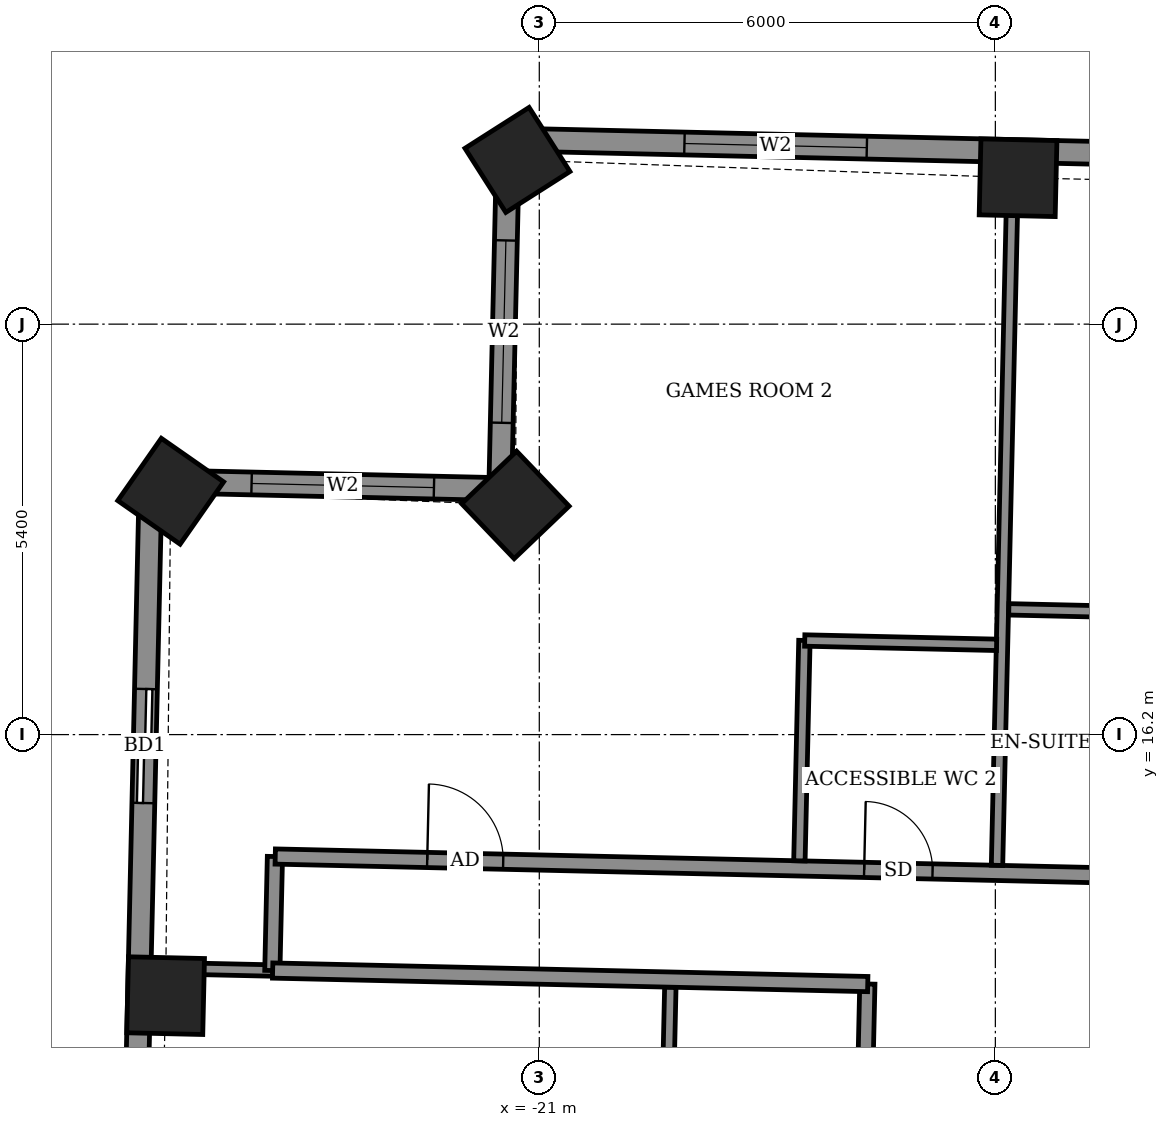
"""IFC4 building model, lengths in metres.
Left out: names, types, materials, properties, quantities, classifications, styles, units other than length and angle.
Written with IfcOpenShell. Run it as: python <this file> out.ifc"""

import sys

from ifc_helpers import new_model, si_unit, direction, frame, frame_2d, origin, origin_2d, place, context, subcontext, project, spatial, rectangle, extrude, element, fill, save


model = new_model("IFC4")
c1 = context("Model", 3, precision=1e-05, world=origin(), true_north=direction((0.0, 1.0)))
c2 = subcontext(c1, "Body", "Model", "MODEL_VIEW")
j1 = project(units=[si_unit("LENGTHUNIT", "METRE"), si_unit("PLANEANGLEUNIT", "RADIAN")], contexts=[c1])
p1 = place(None, origin())
s1 = spatial("IfcSite", under=j1, at=p1, CompositionType="ELEMENT")
p2 = place(p1, origin())
s2 = spatial("IfcBuilding", under=s1, at=p2, CompositionType="ELEMENT")
p3 = place(p2, frame((0.0, 0.0, 257.3)))
s3 = spatial("IfcBuildingStorey", under=s2, at=p3, CompositionType="ELEMENT", Elevation=257.3)
for number, where, z_axis, x_axis in (
    (1, (-14.701, 23.526, -0.55), (0.0, 0.0, 1.0), (-1.0, 0.023, 0.0)),
    (2, (-21.287, 23.76, -0.55), (0.0, 0.0, 1.0), (-0.843, -0.538, 0.0)),
    (3, (-21.314, 19.221, -0.55), (0.0, 0.0, 1.0), (-0.723, -0.691, 0.0)),
    (4, (-25.849, 19.402, -0.55), (0.0, 0.0, 1.0), (-0.573, -0.82, 0.0)),
    (5, (-25.916, 12.766, -0.55), (0.0, 0.0, 1.0), (-0.023, -1.0, 0.0)),
):
    element("IfcColumn", number, at=place(p3, frame(where, z_axis=z_axis, x_axis=x_axis)), inside=s3, PredefinedType="COLUMN", context=c2, shape_type="SweptSolid", body=[
        extrude(rectangle(XDim=1.0, YDim=1.0, at=origin_2d()), origin(), (0.0, 0.0, 1.0), 3.6),
    ])
p4 = place(p3, frame((26.35, 22.945, 0.0), z_axis=(0.0, 0.0, 1.0), x_axis=(-0.999742523712, 0.022691105788, 0.0)))
e6 = element("IfcWall", 6, at=p4, inside=s3, PredefinedType="SOLIDWALL", context=c2, shape_type="SweptSolid", body=[
    extrude(rectangle(XDim=47.771, YDim=0.3, at=frame_2d((23.886, 0.0))), origin(), (0.0, 0.0, 1.0), 2.55),
])
p5 = place(p4, frame((1.578, 0.0, 0.0)))
e7 = element("IfcOpeningElement", 7, at=p5, cuts=e6, PredefinedType="OPENING", context=c2, shape_type="SweptSolid", body=[
    extrude(rectangle(XDim=1.5, YDim=2.4, at=frame_2d((0.75, 1.2))), frame((0.0, 0.16, 0.0), z_axis=(0.0, -1.0, 0.0), x_axis=(1.0, 0.0, 0.0)), (0.0, 0.0, 1.0), 0.32),
])
p6 = place(p4, frame((4.545, 0.0, 0.0)))
e8 = element("IfcOpeningElement", 8, at=p6, cuts=e6, PredefinedType="OPENING", context=c2, shape_type="SweptSolid", body=[
    extrude(rectangle(XDim=1.5, YDim=2.4, at=frame_2d((0.75, 1.2))), frame((0.0, 0.16, 0.0), z_axis=(0.0, -1.0, 0.0), x_axis=(1.0, 0.0, 0.0)), (0.0, 0.0, 1.0), 0.32),
])
p7 = place(p4, frame((10.354, 0.0, 0.0)))
e9 = element("IfcOpeningElement", 9, at=p7, cuts=e6, PredefinedType="OPENING", context=c2, shape_type="SweptSolid", body=[
    extrude(rectangle(XDim=1.5, YDim=2.4, at=frame_2d((0.75, 1.2))), frame((0.0, 0.16, 0.0), z_axis=(0.0, -1.0, 0.0), x_axis=(1.0, 0.0, 0.0)), (0.0, 0.0, 1.0), 0.32),
])
p8 = place(p4, frame((15.204, 0.0, 0.0)))
e10 = element("IfcOpeningElement", 10, at=p8, cuts=e6, PredefinedType="OPENING", context=c2, shape_type="SweptSolid", body=[
    extrude(rectangle(XDim=1.5, YDim=2.4, at=frame_2d((0.75, 1.2))), frame((0.0, 0.16, 0.0), z_axis=(0.0, -1.0, 0.0), x_axis=(1.0, 0.0, 0.0)), (0.0, 0.0, 1.0), 0.32),
])
p9 = place(p4, frame((18.537, 0.0, 0.0)))
e11 = element("IfcOpeningElement", 11, at=p9, cuts=e6, PredefinedType="OPENING", context=c2, shape_type="SweptSolid", body=[
    extrude(rectangle(XDim=1.2, YDim=2.4, at=frame_2d((0.6, 1.2))), frame((0.0, 0.16, 0.0), z_axis=(0.0, -1.0, 0.0), x_axis=(1.0, 0.0, 0.0)), (0.0, 0.0, 1.0), 0.32),
])
p10 = place(p4, frame((24.171, 0.0, 0.0)))
e12 = element("IfcOpeningElement", 12, at=p10, cuts=e6, PredefinedType="OPENING", context=c2, shape_type="SweptSolid", body=[
    extrude(rectangle(XDim=1.5, YDim=2.4, at=frame_2d((0.75, 1.2))), frame((0.0, 0.16, 0.0), z_axis=(0.0, -1.0, 0.0), x_axis=(1.0, 0.0, 0.0)), (0.0, 0.0, 1.0), 0.32),
])
p11 = place(p4, frame((28.871, 0.0, 0.0)))
e13 = element("IfcOpeningElement", 13, at=p11, cuts=e6, PredefinedType="OPENING", context=c2, shape_type="SweptSolid", body=[
    extrude(rectangle(XDim=1.5, YDim=2.4, at=frame_2d((0.75, 1.2))), frame((0.0, 0.16, 0.0), z_axis=(0.0, -1.0, 0.0), x_axis=(1.0, 0.0, 0.0)), (0.0, 0.0, 1.0), 0.32),
])
p12 = place(p4, frame((32.055, 0.0, 0.0)))
e14 = element("IfcOpeningElement", 14, at=p12, cuts=e6, PredefinedType="OPENING", context=c2, shape_type="SweptSolid", body=[
    extrude(rectangle(XDim=1.5, YDim=2.4, at=frame_2d((0.75, 1.2))), frame((0.0, 0.16, 0.0), z_axis=(0.0, -1.0, 0.0), x_axis=(1.0, 0.0, 0.0)), (0.0, 0.0, 1.0), 0.32),
])
p13 = place(p4, frame((37.813, 0.0, 0.0)))
e15 = element("IfcOpeningElement", 15, at=p13, cuts=e6, PredefinedType="OPENING", context=c2, shape_type="SweptSolid", body=[
    extrude(rectangle(XDim=1.5, YDim=2.4, at=frame_2d((0.75, 1.2))), frame((0.0, 0.16, 0.0), z_axis=(0.0, -1.0, 0.0), x_axis=(1.0, 0.0, 0.0)), (0.0, 0.0, 1.0), 0.32),
])
p14 = place(p4, frame((43.052, 0.0, 0.9)))
e16 = element("IfcOpeningElement", 16, at=p14, cuts=e6, PredefinedType="OPENING", context=c2, shape_type="SweptSolid", body=[
    extrude(rectangle(XDim=2.4, YDim=1.5, at=frame_2d((1.2, 0.75))), frame((0.0, 0.16, 0.0), z_axis=(0.0, -1.0, 0.0), x_axis=(1.0, 0.0, 0.0)), (0.0, 0.0, 1.0), 0.32),
])
p15 = place(p3, frame((-21.409, 24.029, 0.0), z_axis=(0.0, 0.0, 1.0), x_axis=(-0.022820258049, -0.999739584003, 0.0)))
e17 = element("IfcWall", 17, at=p15, inside=s3, PredefinedType="SOLIDWALL", context=c2, shape_type="SweptSolid", body=[
    extrude(rectangle(XDim=4.6, YDim=0.3, at=frame_2d((2.3, 0.0))), origin(), (0.0, 0.0, 1.0), 2.55),
])
p16 = place(p15, frame((1.328, 0.0, 0.9)))
e18 = element("IfcOpeningElement", 18, at=p16, cuts=e17, PredefinedType="OPENING", context=c2, shape_type="SweptSolid", body=[
    extrude(rectangle(XDim=2.4, YDim=1.5, at=frame_2d((1.2, 0.75))), frame((0.0, 0.16, 0.0), z_axis=(0.0, -1.0, 0.0), x_axis=(1.0, 0.0, 0.0)), (0.0, 0.0, 1.0), 0.32),
])
p17 = place(p3, frame((-21.514, 19.43, 0.0), z_axis=(0.0, 0.0, 1.0), x_axis=(-0.999744404568, 0.02260808559, 0.0)))
e19 = element("IfcWall", 19, at=p17, inside=s3, PredefinedType="SOLIDWALL", context=c2, shape_type="SweptSolid", body=[
    extrude(rectangle(XDim=4.6, YDim=0.3, at=frame_2d((2.3, 0.0))), origin(), (0.0, 0.0, 1.0), 2.55),
])
p18 = place(p17, frame((0.872, 0.0, 0.9)))
e20 = element("IfcOpeningElement", 20, at=p18, cuts=e19, PredefinedType="OPENING", context=c2, shape_type="SweptSolid", body=[
    extrude(rectangle(XDim=2.4, YDim=1.5, at=frame_2d((1.2, 0.75))), frame((0.0, 0.16, 0.0), z_axis=(0.0, -1.0, 0.0), x_axis=(1.0, 0.0, 0.0)), (0.0, 0.0, 1.0), 0.32),
])
p19 = place(p3, frame((-26.113, 19.534, 0.0), z_axis=(0.0, 0.0, 1.0), x_axis=(-0.022649415303, -0.999743469089, 0.0)))
e21 = element("IfcWall", 21, at=p19, inside=s3, PredefinedType="SOLIDWALL", context=c2, shape_type="SweptSolid", body=[
    extrude(rectangle(XDim=14.175, YDim=0.3, at=frame_2d((7.087, 0.0))), origin(), (0.0, 0.0, 1.0), 2.55),
])
p20 = place(p19, frame((2.735, 0.0, 0.0)))
e22 = element("IfcOpeningElement", 22, at=p20, cuts=e21, PredefinedType="OPENING", context=c2, shape_type="SweptSolid", body=[
    extrude(rectangle(XDim=1.5, YDim=2.4, at=frame_2d((0.75, 1.2))), frame((0.0, 0.16, 0.0), z_axis=(0.0, -1.0, 0.0), x_axis=(1.0, 0.0, 0.0)), (0.0, 0.0, 1.0), 0.32),
])
p21 = place(p19, frame((9.019, 0.0, 0.9)))
e23 = element("IfcOpeningElement", 23, at=p21, cuts=e21, PredefinedType="OPENING", context=c2, shape_type="SweptSolid", body=[
    extrude(rectangle(XDim=2.4, YDim=1.5, at=frame_2d((1.2, 0.75))), frame((0.0, 0.16, 0.0), z_axis=(0.0, -1.0, 0.0), x_axis=(1.0, 0.0, 0.0)), (0.0, 0.0, 1.0), 0.32),
])
p22 = place(p3, frame((-17.262, -12.525, 0.0), z_axis=(0.0, 0.0, 1.0), x_axis=(0.022706151961, 0.999742182097, 0.0)))
e24 = element("IfcWall", 24, at=p22, inside=s3, PredefinedType="PARTITIONING", context=c2, shape_type="SweptSolid", body=[
    extrude(rectangle(XDim=25.45, YDim=0.2, at=frame_2d((12.725, 0.0))), origin(), (0.0, 0.0, 1.0), 3.05),
])
p23 = place(p22, frame((19.913, 0.0, 0.0)))
e25 = element("IfcOpeningElement", 25, at=p23, cuts=e24, PredefinedType="OPENING", context=c2, shape_type="SweptSolid", body=[
    extrude(rectangle(XDim=1.0, YDim=2.1, at=frame_2d((0.5, 1.05))), frame((0.0, 0.11, 0.0), z_axis=(0.0, -1.0, 0.0), x_axis=(1.0, 0.0, 0.0)), (0.0, 0.0, 1.0), 0.22),
])
p24 = place(p22, frame((23.6, 0.0, 0.0)))
e26 = element("IfcOpeningElement", 26, at=p24, cuts=e24, PredefinedType="OPENING", context=c2, shape_type="SweptSolid", body=[
    extrude(rectangle(XDim=0.9, YDim=2.1, at=frame_2d((0.45, 1.05))), frame((0.0, 0.11, 0.0), z_axis=(0.0, -1.0, 0.0), x_axis=(1.0, 0.0, 0.0)), (0.0, 0.0, 1.0), 0.22),
])
p25 = place(p22, frame((14.05, 0.0, 0.0)))
e27 = element("IfcOpeningElement", 27, at=p25, cuts=e24, PredefinedType="OPENING", context=c2, shape_type="SweptSolid", body=[
    extrude(rectangle(XDim=1.0, YDim=2.1, at=frame_2d((0.5, 1.05))), frame((0.0, 0.11, 0.0), z_axis=(0.0, -1.0, 0.0), x_axis=(1.0, 0.0, 0.0)), (0.0, 0.0, 1.0), 0.22),
])
p26 = place(p22, frame((16.525, 0.0, 0.0)))
e28 = element("IfcOpeningElement", 28, at=p26, cuts=e24, PredefinedType="OPENING", context=c2, shape_type="SweptSolid", body=[
    extrude(rectangle(XDim=0.9, YDim=2.1, at=frame_2d((0.45, 1.05))), frame((0.0, 0.11, 0.0), z_axis=(0.0, -1.0, 0.0), x_axis=(1.0, 0.0, 0.0)), (0.0, 0.0, 1.0), 0.22),
])
p27 = place(p22, frame((11.825, 0.0, 0.0)))
e29 = element("IfcOpeningElement", 29, at=p27, cuts=e24, PredefinedType="OPENING", context=c2, shape_type="SweptSolid", body=[
    extrude(rectangle(XDim=1.0, YDim=2.1, at=frame_2d((0.5, 1.05))), frame((0.0, 0.11, 0.0), z_axis=(0.0, -1.0, 0.0), x_axis=(1.0, 0.0, 0.0)), (0.0, 0.0, 1.0), 0.22),
])
p28 = place(p22, frame((9.575, 0.0, 0.0)))
e30 = element("IfcOpeningElement", 30, at=p28, cuts=e24, PredefinedType="OPENING", context=c2, shape_type="SweptSolid", body=[
    extrude(rectangle(XDim=0.9, YDim=2.1, at=frame_2d((0.45, 1.05))), frame((0.0, 0.11, 0.0), z_axis=(0.0, -1.0, 0.0), x_axis=(1.0, 0.0, 0.0)), (0.0, 0.0, 1.0), 0.22),
])
p29 = place(p22, frame((6.155, 0.0, 0.0)))
e31 = element("IfcOpeningElement", 31, at=p29, cuts=e24, PredefinedType="OPENING", context=c2, shape_type="SweptSolid", body=[
    extrude(rectangle(XDim=1.0, YDim=2.1, at=frame_2d((0.5, 1.05))), frame((0.0, 0.11, 0.0), z_axis=(0.0, -1.0, 0.0), x_axis=(1.0, 0.0, 0.0)), (0.0, 0.0, 1.0), 0.22),
])
p30 = place(p22, frame((0.512, 0.0, 0.0)))
e32 = element("IfcOpeningElement", 32, at=p30, cuts=e24, PredefinedType="OPENING", context=c2, shape_type="SweptSolid", body=[
    extrude(rectangle(XDim=1.0, YDim=2.1, at=frame_2d((0.5, 1.05))), frame((0.0, 0.11, 0.0), z_axis=(0.0, -1.0, 0.0), x_axis=(1.0, 0.0, 0.0)), (0.0, 0.0, 1.0), 0.22),
])
p31 = place(p22, frame((2.775, 0.0, 0.0)))
e33 = element("IfcOpeningElement", 33, at=p31, cuts=e24, PredefinedType="OPENING", context=c2, shape_type="SweptSolid", body=[
    extrude(rectangle(XDim=0.9, YDim=2.1, at=frame_2d((0.45, 1.05))), frame((0.0, 0.11, 0.0), z_axis=(0.0, -1.0, 0.0), x_axis=(1.0, 0.0, 0.0)), (0.0, 0.0, 1.0), 0.22),
])
p32 = place(p3, frame((-19.337, 10.178, 0.0), z_axis=(0.0, 0.0, 1.0), x_axis=(0.02260842146, 0.999744396973, 0.0)))
e34 = element("IfcWall", 34, at=p32, inside=s3, PredefinedType="PARTITIONING", context=c2, shape_type="SweptSolid", body=[
    extrude(rectangle(XDim=2.7, YDim=0.15, at=frame_2d((1.35, 0.0))), origin(), (0.0, 0.0, 1.0), 3.05),
])
p33 = place(p3, frame((-26.108, 13.132, 0.0), z_axis=(0.0, 0.0, 1.0), x_axis=(0.999746371854, -0.022520922836, 0.0)))
e35 = element("IfcWall", 35, at=p33, inside=s3, PredefinedType="PARTITIONING", context=c2, shape_type="SweptSolid", body=[
    extrude(rectangle(XDim=1.604, YDim=0.15, at=frame_2d((0.802, 0.0))), origin(), (0.0, 0.0, 1.0), 3.05),
])
p34 = place(p3, frame((-24.512, 13.096, 0.0), z_axis=(0.0, 0.0, 1.0), x_axis=(0.022617910375, 0.999744182344, 0.0)))
e36 = element("IfcWall", 36, at=p34, inside=s3, PredefinedType="PARTITIONING", context=c2, shape_type="SweptSolid", body=[
    extrude(rectangle(XDim=1.5, YDim=0.2, at=frame_2d((0.75, 0.0))), origin(), (0.0, 0.0, 1.0), 3.05),
])
p35 = place(p3, frame((-24.508, 13.096, 0.0), z_axis=(0.0, 0.0, 1.0), x_axis=(0.99974170677, -0.022727070732, 0.0)))
e37 = element("IfcWall", 37, at=p35, inside=s3, PredefinedType="PARTITIONING", context=c2, shape_type="SweptSolid", body=[
    extrude(rectangle(XDim=7.831, YDim=0.2, at=frame_2d((3.916, 0.0))), origin(), (0.0, 0.0, 1.0), 3.05),
])
p36 = place(p3, frame((-24.474, 14.596, 0.0), z_axis=(0.0, 0.0, 1.0), x_axis=(0.999742424031, -0.022695497208, 0.0)))
e38 = element("IfcWall", 38, at=p36, inside=s3, PredefinedType="PARTITIONING", context=c2, shape_type="SweptSolid", body=[
    extrude(rectangle(XDim=52.872, YDim=0.2, at=frame_2d((26.436, 0.0))), origin(), (0.0, 0.0, 1.0), 3.05),
])
p37 = place(p36, frame((51.336, 0.0, 0.0)))
e39 = element("IfcOpeningElement", 39, at=p37, cuts=e38, PredefinedType="OPENING", context=c2, shape_type="SweptSolid", body=[
    extrude(rectangle(XDim=1.0, YDim=2.1, at=frame_2d((0.5, 1.05))), frame((0.0, 0.11, 0.0), z_axis=(0.0, -1.0, 0.0), x_axis=(1.0, 0.0, 0.0)), (0.0, 0.0, 1.0), 0.22),
])
p38 = place(p36, frame((47.25, 0.0, 0.0)))
e40 = element("IfcOpeningElement", 40, at=p38, cuts=e38, PredefinedType="OPENING", context=c2, shape_type="SweptSolid", body=[
    extrude(rectangle(XDim=0.9, YDim=2.1, at=frame_2d((0.45, 1.05))), frame((0.0, 0.11, 0.0), z_axis=(0.0, -1.0, 0.0), x_axis=(1.0, 0.0, 0.0)), (0.0, 0.0, 1.0), 0.22),
])
p39 = place(p36, frame((42.475, 0.0, 0.0)))
e41 = element("IfcOpeningElement", 41, at=p39, cuts=e38, PredefinedType="OPENING", context=c2, shape_type="SweptSolid", body=[
    extrude(rectangle(XDim=0.9, YDim=2.1, at=frame_2d((0.45, 1.05))), frame((0.0, 0.11, 0.0), z_axis=(0.0, -1.0, 0.0), x_axis=(1.0, 0.0, 0.0)), (0.0, 0.0, 1.0), 0.22),
])
p40 = place(p36, frame((40.15, 0.0, 0.0)))
e42 = element("IfcOpeningElement", 42, at=p40, cuts=e38, PredefinedType="OPENING", context=c2, shape_type="SweptSolid", body=[
    extrude(rectangle(XDim=0.9, YDim=2.1, at=frame_2d((0.45, 1.05))), frame((0.0, 0.11, 0.0), z_axis=(0.0, -1.0, 0.0), x_axis=(1.0, 0.0, 0.0)), (0.0, 0.0, 1.0), 0.22),
])
p41 = place(p36, frame((33.15, 0.0, 0.0)))
e43 = element("IfcOpeningElement", 43, at=p41, cuts=e38, PredefinedType="OPENING", context=c2, shape_type="SweptSolid", body=[
    extrude(rectangle(XDim=0.9, YDim=2.1, at=frame_2d((0.45, 1.05))), frame((0.0, 0.11, 0.0), z_axis=(0.0, -1.0, 0.0), x_axis=(1.0, 0.0, 0.0)), (0.0, 0.0, 1.0), 0.22),
])
p42 = place(p36, frame((30.95, 0.0, 0.0)))
e44 = element("IfcOpeningElement", 44, at=p42, cuts=e38, PredefinedType="OPENING", context=c2, shape_type="SweptSolid", body=[
    extrude(rectangle(XDim=0.9, YDim=2.1, at=frame_2d((0.45, 1.05))), frame((0.0, 0.11, 0.0), z_axis=(0.0, -1.0, 0.0), x_axis=(1.0, 0.0, 0.0)), (0.0, 0.0, 1.0), 0.22),
])
p43 = place(p36, frame((23.975, 0.0, 0.0)))
e45 = element("IfcOpeningElement", 45, at=p43, cuts=e38, PredefinedType="OPENING", context=c2, shape_type="SweptSolid", body=[
    extrude(rectangle(XDim=0.9, YDim=2.1, at=frame_2d((0.45, 1.05))), frame((0.0, 0.11, 0.0), z_axis=(0.0, -1.0, 0.0), x_axis=(1.0, 0.0, 0.0)), (0.0, 0.0, 1.0), 0.22),
])
p44 = place(p36, frame((21.925, 0.0, 0.0)))
e46 = element("IfcOpeningElement", 46, at=p44, cuts=e38, PredefinedType="OPENING", context=c2, shape_type="SweptSolid", body=[
    extrude(rectangle(XDim=0.9, YDim=2.1, at=frame_2d((0.45, 1.05))), frame((0.0, 0.11, 0.0), z_axis=(0.0, -1.0, 0.0), x_axis=(1.0, 0.0, 0.0)), (0.0, 0.0, 1.0), 0.22),
])
p45 = place(p36, frame((14.975, 0.0, 0.0)))
e47 = element("IfcOpeningElement", 47, at=p45, cuts=e38, PredefinedType="OPENING", context=c2, shape_type="SweptSolid", body=[
    extrude(rectangle(XDim=0.9, YDim=2.1, at=frame_2d((0.45, 1.05))), frame((0.0, 0.11, 0.0), z_axis=(0.0, -1.0, 0.0), x_axis=(1.0, 0.0, 0.0)), (0.0, 0.0, 1.0), 0.22),
])
p46 = place(p36, frame((12.65, 0.0, 0.0)))
e48 = element("IfcOpeningElement", 48, at=p46, cuts=e38, PredefinedType="OPENING", context=c2, shape_type="SweptSolid", body=[
    extrude(rectangle(XDim=0.9, YDim=2.1, at=frame_2d((0.45, 1.05))), frame((0.0, 0.11, 0.0), z_axis=(0.0, -1.0, 0.0), x_axis=(1.0, 0.0, 0.0)), (0.0, 0.0, 1.0), 0.22),
])
p47 = place(p36, frame((2.0, 0.0, 0.0)))
e49 = element("IfcOpeningElement", 49, at=p47, cuts=e38, PredefinedType="OPENING", context=c2, shape_type="SweptSolid", body=[
    extrude(rectangle(XDim=1.0, YDim=2.1, at=frame_2d((0.5, 1.05))), frame((0.0, 0.11, 0.0), z_axis=(0.0, -1.0, 0.0), x_axis=(1.0, 0.0, 0.0)), (0.0, 0.0, 1.0), 0.22),
])
p48 = place(p36, frame((7.75, 0.0, 0.0)))
e50 = element("IfcOpeningElement", 50, at=p48, cuts=e38, PredefinedType="OPENING", context=c2, shape_type="SweptSolid", body=[
    extrude(rectangle(XDim=0.9, YDim=2.1, at=frame_2d((0.45, 1.05))), frame((0.0, 0.11, 0.0), z_axis=(0.0, -1.0, 0.0), x_axis=(1.0, 0.0, 0.0)), (0.0, 0.0, 1.0), 0.22),
])
p49 = place(p3, frame((-17.578, 14.539, 0.0), z_axis=(0.0, 0.0, 1.0), x_axis=(0.022725229174, 0.999741748633, 0.0)))
e51 = element("IfcWall", 51, at=p49, inside=s3, PredefinedType="PARTITIONING", context=c2, shape_type="SweptSolid", body=[
    extrude(rectangle(XDim=2.901, YDim=0.15, at=frame_2d((1.45, 0.0))), origin(), (0.0, 0.0, 1.0), 3.05),
])
p50 = place(p3, frame((-14.978, 14.48, 0.0), z_axis=(0.0, 0.0, 1.0), x_axis=(0.022697424684, 0.999742380272, 0.0)))
e52 = element("IfcWall", 52, at=p50, inside=s3, PredefinedType="PARTITIONING", context=c2, shape_type="SweptSolid", body=[
    extrude(rectangle(XDim=9.25, YDim=0.15, at=frame_2d((4.625, 0.0))), origin(), (0.0, 0.0, 1.0), 3.05),
])
p51 = place(p3, frame((-17.508, 17.438, 0.0), z_axis=(0.0, 0.0, 1.0), x_axis=(0.999746160391, -0.022530308093, 0.0)))
e53 = element("IfcWall", 53, at=p51, inside=s3, PredefinedType="PARTITIONING", context=c2, shape_type="SweptSolid", body=[
    extrude(rectangle(XDim=2.525, YDim=0.15, at=frame_2d((1.262, 0.0))), origin(), (0.0, 0.0, 1.0), 3.05),
])
p52 = place(p3, frame((-14.823, 17.848, 0.0), z_axis=(0.0, 0.0, 1.0), x_axis=(0.999740478815, -0.022781023197, 0.0)))
e54 = element("IfcWall", 54, at=p52, inside=s3, PredefinedType="PARTITIONING", context=c2, shape_type="SweptSolid", body=[
    extrude(rectangle(XDim=2.325, YDim=0.15, at=frame_2d((1.163, 0.0))), origin(), (0.0, 0.0, 1.0), 3.05),
])
p53 = place(p14, origin())
e55 = element("IfcWindow", 55, at=p53, inside=s3, PartitioningType="DOUBLE_PANEL_VERTICAL", PredefinedType="WINDOW", context=c2, shape_type="SweptSolid", body=[
    extrude(rectangle(XDim=2.4, YDim=1.5, at=frame_2d((1.2, 0.75))), frame((0.0, 0.03, 0.0), z_axis=(0.0, -1.0, 0.0), x_axis=(1.0, 0.0, 0.0)), (0.0, 0.0, 1.0), 0.06),
])
fill(e16, e55)
p54 = place(p16, origin())
e56 = element("IfcWindow", 56, at=p54, inside=s3, PartitioningType="DOUBLE_PANEL_VERTICAL", PredefinedType="WINDOW", context=c2, shape_type="SweptSolid", body=[
    extrude(rectangle(XDim=2.4, YDim=1.5, at=frame_2d((1.2, 0.75))), frame((0.0, 0.03, 0.0), z_axis=(0.0, -1.0, 0.0), x_axis=(1.0, 0.0, 0.0)), (0.0, 0.0, 1.0), 0.06),
])
fill(e18, e56)
p55 = place(p18, origin())
e57 = element("IfcWindow", 57, at=p55, inside=s3, PartitioningType="DOUBLE_PANEL_VERTICAL", PredefinedType="WINDOW", context=c2, shape_type="SweptSolid", body=[
    extrude(rectangle(XDim=2.4, YDim=1.5, at=frame_2d((1.2, 0.75))), frame((0.0, 0.03, 0.0), z_axis=(0.0, -1.0, 0.0), x_axis=(1.0, 0.0, 0.0)), (0.0, 0.0, 1.0), 0.06),
])
fill(e20, e57)
p56 = place(p20, origin())
e58 = element("IfcDoor", 58, at=p56, inside=s3, OperationType="SLIDING_TO_LEFT", PredefinedType="DOOR", context=c2, shape_type="SweptSolid", body=[
    extrude(rectangle(XDim=1.5, YDim=2.4, at=frame_2d((0.75, 1.2))), frame((0.0, 0.025, 0.0), z_axis=(0.0, -1.0, 0.0), x_axis=(1.0, 0.0, 0.0)), (0.0, 0.0, 1.0), 0.05),
])
fill(e22, e58)
p57 = place(p47, origin())
e59 = element("IfcDoor", 59, at=p57, inside=s3, OperationType="SINGLE_SWING_RIGHT", PredefinedType="DOOR", context=c2, shape_type="SweptSolid", body=[
    extrude(rectangle(XDim=1.0, YDim=2.1, at=frame_2d((0.5, 1.05))), frame((0.0, 0.025, 0.0), z_axis=(0.0, -1.0, 0.0), x_axis=(1.0, 0.0, 0.0)), (0.0, 0.0, 1.0), 0.05),
])
fill(e49, e59)
p58 = place(p48, origin())
e60 = element("IfcDoor", 60, at=p58, inside=s3, OperationType="SINGLE_SWING_RIGHT", PredefinedType="DOOR", context=c2, shape_type="SweptSolid", body=[
    extrude(rectangle(XDim=0.9, YDim=2.1, at=frame_2d((0.45, 1.05))), frame((0.0, 0.025, 0.0), z_axis=(0.0, -1.0, 0.0), x_axis=(1.0, 0.0, 0.0)), (0.0, 0.0, 1.0), 0.05),
])
fill(e50, e60)
save(model, sys.argv[1])
